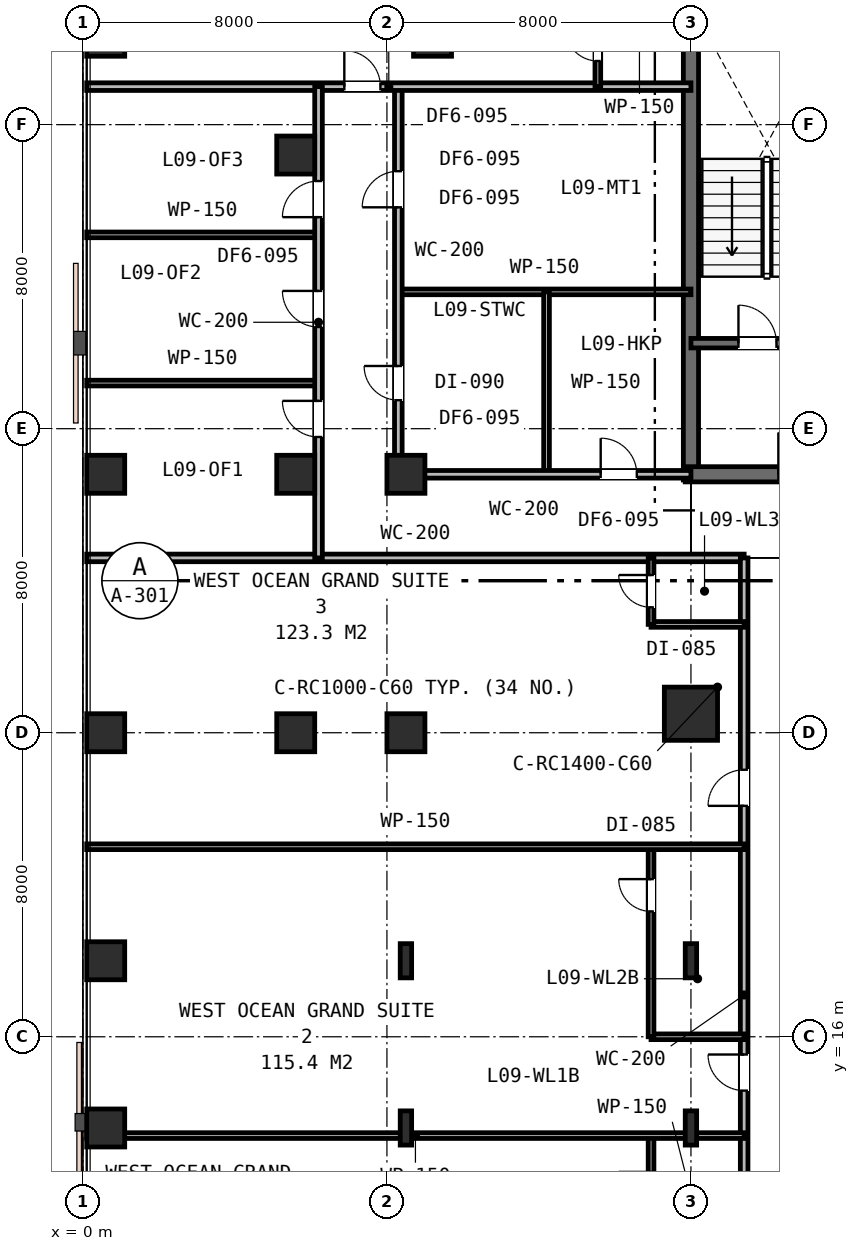
"""IFC4 building model, lengths in metres.
Left out: names, types, materials, properties, quantities, classifications, styles, units other than length and angle.
Written with IfcOpenShell. Run it as: python <this file> out.ifc"""

import sys

from ifc_helpers import new_model, si_unit, direction, frame, frame_2d, origin, origin_2d, place, context, subcontext, project, spatial, rectangle, i_section, extrude, element, fill, save


model = new_model("IFC4")
c1 = context("Model", 3, precision=1e-05, world=origin(), true_north=direction((0.0, 1.0)))
c2 = subcontext(c1, "Body", "Model", "MODEL_VIEW")
j1 = project(units=[si_unit("LENGTHUNIT", "METRE"), si_unit("PLANEANGLEUNIT", "RADIAN")], contexts=[c1])
p1 = place(None, origin())
s1 = spatial("IfcSite", under=j1, at=p1, CompositionType="ELEMENT")
p2 = place(p1, origin())
s2 = spatial("IfcBuilding", under=s1, at=p2, CompositionType="ELEMENT")
p3 = place(p2, frame((0.0, 0.0, 40.2)))
s3 = spatial("IfcBuildingStorey", under=s2, at=p3, CompositionType="ELEMENT", Elevation=40.2)
p4 = place(p3, frame((16.0, 30.65, 0.0), z_axis=(0.0, 0.0, 1.0), x_axis=(0.0, 1.0, 0.0)))
e1 = element("IfcWall", 1, at=p4, inside=s3, PredefinedType="SHEAR", context=c2, shape_type="SweptSolid", body=[
    extrude(rectangle(XDim=12.3, YDim=0.4, at=frame_2d((6.15, 0.0))), origin(), (0.0, 0.0, 1.0), 3.6),
])
p5 = place(p3, frame((15.85, 30.8, 0.0), z_axis=(0.0, 0.0, 1.0), x_axis=(1.0, 0.0, 0.0)))
e2 = element("IfcWall", 2, at=p5, inside=s3, PredefinedType="SHEAR", context=c2, shape_type="SweptSolid", body=[
    extrude(rectangle(XDim=11.2, YDim=0.4, at=frame_2d((5.6, 0.0))), origin(), (0.0, 0.0, 1.0), 3.6),
])
p6 = place(p5, frame((2.45, 0.0, 0.0)))
e3 = element("IfcOpeningElement", 3, at=p6, cuts=e2, PredefinedType="OPENING", context=c2, shape_type="SweptSolid", body=[
    extrude(rectangle(XDim=1.1, YDim=2.15, at=frame_2d((0.55, 1.075))), frame((0.0, 0.21, 0.0), z_axis=(0.0, -1.0, 0.0), x_axis=(1.0, 0.0, 0.0)), (0.0, 0.0, 1.0), 0.42),
])
p7 = place(p3, frame((16.0, 34.25, 0.0), z_axis=(0.0, 0.0, 1.0), x_axis=(1.0, 0.0, 0.0)))
e4 = element("IfcWall", 4, at=p7, inside=s3, PredefinedType="SHEAR", context=c2, shape_type="SweptSolid", body=[
    extrude(rectangle(XDim=6.05, YDim=0.25, at=frame_2d((3.025, 0.0))), origin(), (0.0, 0.0, 1.0), 3.6),
])
p8 = place(p7, frame((1.25, 0.0, 0.0)))
e5 = element("IfcOpeningElement", 5, at=p8, cuts=e4, PredefinedType="OPENING", context=c2, shape_type="SweptSolid", body=[
    extrude(rectangle(XDim=1.0, YDim=2.15, at=frame_2d((0.5, 1.075))), frame((0.0, 0.135, 0.0), z_axis=(0.0, -1.0, 0.0), x_axis=(1.0, 0.0, 0.0)), (0.0, 0.0, 1.0), 0.27),
])
p9 = place(p7, frame((4.2, 0.0, 0.0)))
e6 = element("IfcOpeningElement", 6, at=p9, cuts=e4, PredefinedType="OPENING", context=c2, shape_type="SweptSolid", body=[
    extrude(rectangle(XDim=1.1, YDim=2.15, at=frame_2d((0.55, 1.075))), frame((0.0, 0.135, 0.0), z_axis=(0.0, -1.0, 0.0), x_axis=(1.0, 0.0, 0.0)), (0.0, 0.0, 1.0), 0.27),
])
p10 = place(p3, frame((8.5, 24.0, 0.0), z_axis=(0.0, 0.0, 1.0), x_axis=(1.0, 0.0, 0.0)))
e7 = element("IfcColumn", 7, at=p10, inside=s3, PredefinedType="COLUMN", context=c2, shape_type="SweptSolid", body=[
    extrude(rectangle(XDim=1.0, YDim=1.0, at=origin_2d()), origin(), (0.0, 0.0, 1.0), 3.6),
])
p11 = place(p3, frame((16.0, 24.5, 0.0), z_axis=(0.0, 0.0, 1.0), x_axis=(1.0, 0.0, 0.0)))
e8 = element("IfcColumn", 8, at=p11, inside=s3, PredefinedType="COLUMN", context=c2, shape_type="SweptSolid", body=[
    extrude(rectangle(XDim=1.4, YDim=1.4, at=origin_2d()), origin(), (0.0, 0.0, 1.0), 3.6),
])
for number, where, z_axis, x_axis in (
    (9, (5.6, 24.0, 0.0), (0.0, 0.0, 1.0), (1.0, 0.0, 0.0)),
    (10, (5.6, 30.8, 0.0), (0.0, 0.0, 1.0), (1.0, 0.0, 0.0)),
    (11, (5.6, 39.2, 0.0), (0.0, 0.0, 1.0), (1.0, 0.0, 0.0)),
    (12, (8.5, 30.8, 0.0), (0.0, 0.0, 1.0), (1.0, 0.0, 0.0)),
    (13, (9.2, 42.3, 0.0), (0.0, 0.0, 1.0), (1.0, 0.0, 0.0)),
    (14, (0.6, 24.0, 0.0), (0.0, 0.0, 1.0), (1.0, 0.0, 0.0)),
    (15, (0.6, 30.8, 0.0), (0.0, 0.0, 1.0), (1.0, 0.0, 0.0)),
    (16, (0.6, 42.3, 0.0), (0.0, 0.0, 1.0), (1.0, 0.0, 0.0)),
    (17, (0.6, 13.6, 0.0), (0.0, 0.0, 1.0), (1.0, 0.0, 0.0)),
    (18, (0.6, 18.0, 0.0), (0.0, 0.0, 1.0), (1.0, 0.0, 0.0)),
):
    element("IfcColumn", number, at=place(p3, frame(where, z_axis=z_axis, x_axis=x_axis)), inside=s3, PredefinedType="COLUMN", context=c2, shape_type="SweptSolid", body=[
        extrude(rectangle(XDim=1.0, YDim=1.0, at=origin_2d()), origin(), (0.0, 0.0, 1.0), 3.6),
    ])
for number, where, z_axis, x_axis in (
    (19, (8.5, 13.6, 0.0), (0.0, 0.0, 1.0), (1.0, 0.0, 0.0)),
    (20, (16.0, 13.6, 0.0), (0.0, 0.0, 1.0), (1.0, 0.0, 0.0)),
    (21, (8.5, 18.0, 0.0), (0.0, 0.0, 1.0), (1.0, 0.0, 0.0)),
    (22, (16.0, 18.0, 0.0), (0.0, 0.0, 1.0), (1.0, 0.0, 0.0)),
):
    element("IfcColumn", number, at=place(p3, frame(where, z_axis=z_axis, x_axis=x_axis)), inside=s3, PredefinedType="COLUMN", context=c2, shape_type="SweptSolid", body=[
        extrude(i_section(OverallWidth=0.3, OverallDepth=0.9, WebThickness=0.018, FlangeThickness=0.035, FilletRadius=0.03, at=origin_2d()), origin(), (0.0, 0.0, 1.0), 3.6),
    ])
p12 = place(p3, frame((0.1, 28.6, 0.0), z_axis=(0.0, 0.0, 1.0), x_axis=(1.0, 0.0, 0.0)))
e23 = element("IfcWall", 23, at=p12, inside=s3, PredefinedType="PARTITIONING", context=c2, shape_type="SweptSolid", body=[
    extrude(rectangle(XDim=17.3, YDim=0.2, at=frame_2d((8.65, 0.0))), origin(), (0.0, 0.0, 1.0), 2.82),
])
p13 = place(p3, frame((8.3, 35.6, 0.0), z_axis=(0.0, 0.0, 1.0), x_axis=(1.0, 0.0, 0.0)))
e24 = element("IfcWall", 24, at=p13, inside=s3, PredefinedType="PARTITIONING", context=c2, shape_type="SweptSolid", body=[
    extrude(rectangle(XDim=7.7, YDim=0.15, at=frame_2d((3.85, 0.0))), origin(), (0.0, 0.0, 1.0), 2.82),
])
p14 = place(p3, frame((12.2, 30.8, 0.0), z_axis=(0.0, 0.0, 1.0), x_axis=(0.0, 1.0, 0.0)))
e25 = element("IfcWall", 25, at=p14, inside=s3, PredefinedType="PARTITIONING", context=c2, shape_type="SweptSolid", body=[
    extrude(rectangle(XDim=4.8, YDim=0.15, at=frame_2d((2.4, 0.0))), origin(), (0.0, 0.0, 1.0), 2.82),
])
p15 = place(p3, frame((8.3, 30.8, 0.0), z_axis=(0.0, 0.0, 1.0), x_axis=(1.0, 0.0, 0.0)))
e26 = element("IfcWall", 26, at=p15, inside=s3, PredefinedType="PARTITIONING", context=c2, shape_type="SweptSolid", body=[
    extrude(rectangle(XDim=7.7, YDim=0.2, at=frame_2d((3.85, 0.0))), origin(), (0.0, 0.0, 1.0), 2.82),
])
p16 = place(p15, frame((5.325, 0.0, 0.0)))
e27 = element("IfcOpeningElement", 27, at=p16, cuts=e26, PredefinedType="OPENING", context=c2, shape_type="SweptSolid", body=[
    extrude(rectangle(XDim=0.95, YDim=2.15, at=frame_2d((0.475, 1.075))), frame((0.0, 0.11, 0.0), z_axis=(0.0, -1.0, 0.0), x_axis=(1.0, 0.0, 0.0)), (0.0, 0.0, 1.0), 0.22),
])
p17 = place(p3, frame((8.3, 30.8, 0.0), z_axis=(0.0, 0.0, 1.0), x_axis=(0.0, 1.0, 0.0)))
e28 = element("IfcWall", 28, at=p17, inside=s3, PredefinedType="PARTITIONING", context=c2, shape_type="SweptSolid", body=[
    extrude(rectangle(XDim=10.2, YDim=0.2, at=frame_2d((5.1, 0.0))), origin(), (0.0, 0.0, 1.0), 2.82),
])
p18 = place(p17, frame((1.95, 0.0, 0.0)))
e29 = element("IfcOpeningElement", 29, at=p18, cuts=e28, PredefinedType="OPENING", context=c2, shape_type="SweptSolid", body=[
    extrude(rectangle(XDim=0.9, YDim=2.15, at=frame_2d((0.45, 1.075))), frame((0.0, 0.11, 0.0), z_axis=(0.0, -1.0, 0.0), x_axis=(1.0, 0.0, 0.0)), (0.0, 0.0, 1.0), 0.22),
])
p19 = place(p17, frame((7.025, 0.0, 0.0)))
e30 = element("IfcOpeningElement", 30, at=p19, cuts=e28, PredefinedType="OPENING", context=c2, shape_type="SweptSolid", body=[
    extrude(rectangle(XDim=0.95, YDim=2.15, at=frame_2d((0.475, 1.075))), frame((0.0, 0.11, 0.0), z_axis=(0.0, -1.0, 0.0), x_axis=(1.0, 0.0, 0.0)), (0.0, 0.0, 1.0), 0.22),
])
p20 = place(p3, frame((0.1, 41.0, 0.0), z_axis=(0.0, 0.0, 1.0), x_axis=(1.0, 0.0, 0.0)))
e31 = element("IfcWall", 31, at=p20, inside=s3, PredefinedType="PARTITIONING", context=c2, shape_type="SweptSolid", body=[
    extrude(rectangle(XDim=15.9, YDim=0.2, at=frame_2d((7.95, 0.0))), origin(), (0.0, 0.0, 1.0), 2.82),
])
p21 = place(p20, frame((6.779, 0.0, 0.0)))
e32 = element("IfcOpeningElement", 32, at=p21, cuts=e31, PredefinedType="OPENING", context=c2, shape_type="SweptSolid", body=[
    extrude(rectangle(XDim=0.95, YDim=2.15, at=frame_2d((0.475, 1.075))), frame((0.0, 0.11, 0.0), z_axis=(0.0, -1.0, 0.0), x_axis=(1.0, 0.0, 0.0)), (0.0, 0.0, 1.0), 0.22),
])
p22 = place(p3, frame((13.55, 41.0, 0.0), z_axis=(0.0, 0.0, 1.0), x_axis=(0.0, 1.0, 0.0)))
e33 = element("IfcWall", 33, at=p22, inside=s3, PredefinedType="PARTITIONING", context=c2, shape_type="SweptSolid", body=[
    extrude(rectangle(XDim=2.2, YDim=0.15, at=frame_2d((1.1, 0.0))), origin(), (0.0, 0.0, 1.0), 3.33),
])
p23 = place(p22, frame((0.675, 0.0, 0.0)))
e34 = element("IfcOpeningElement", 34, at=p23, cuts=e33, PredefinedType="OPENING", context=c2, shape_type="SweptSolid", body=[
    extrude(rectangle(XDim=0.85, YDim=2.15, at=frame_2d((0.425, 1.075))), frame((0.0, 0.085, 0.0), z_axis=(0.0, -1.0, 0.0), x_axis=(1.0, 0.0, 0.0)), (0.0, 0.0, 1.0), 0.17),
])
for number, where, z_axis, x_axis in (
    (35, (0.1, 33.2, 0.0), (0.0, 0.0, 1.0), (1.0, 0.0, 0.0)),
    (36, (0.1, 37.1, 0.0), (0.0, 0.0, 1.0), (1.0, 0.0, 0.0)),
):
    element("IfcWall", number, at=place(p3, frame(where, z_axis=z_axis, x_axis=x_axis)), inside=s3, PredefinedType="PARTITIONING", context=c2, shape_type="SweptSolid", body=[
        extrude(rectangle(XDim=6.1, YDim=0.15, at=frame_2d((3.05, 0.0))), origin(), (0.0, 0.0, 1.0), 2.82),
    ])
p24 = place(p3, frame((6.2, 28.6, 0.0), z_axis=(0.0, 0.0, 1.0), x_axis=(0.0, 1.0, 0.0)))
e37 = element("IfcWall", 37, at=p24, inside=s3, PredefinedType="PARTITIONING", context=c2, shape_type="SweptSolid", body=[
    extrude(rectangle(XDim=12.4, YDim=0.2, at=frame_2d((6.2, 0.0))), origin(), (0.0, 0.0, 1.0), 2.82),
])
p25 = place(p24, frame((3.182, 0.0, 0.0)))
e38 = element("IfcOpeningElement", 38, at=p25, cuts=e37, PredefinedType="OPENING", context=c2, shape_type="SweptSolid", body=[
    extrude(rectangle(XDim=0.95, YDim=2.15, at=frame_2d((0.475, 1.075))), frame((0.0, 0.11, 0.0), z_axis=(0.0, -1.0, 0.0), x_axis=(1.0, 0.0, 0.0)), (0.0, 0.0, 1.0), 0.22),
])
p26 = place(p24, frame((6.075, 0.0, 0.0)))
e39 = element("IfcOpeningElement", 39, at=p26, cuts=e37, PredefinedType="OPENING", context=c2, shape_type="SweptSolid", body=[
    extrude(rectangle(XDim=0.95, YDim=2.15, at=frame_2d((0.475, 1.075))), frame((0.0, 0.11, 0.0), z_axis=(0.0, -1.0, 0.0), x_axis=(1.0, 0.0, 0.0)), (0.0, 0.0, 1.0), 0.22),
])
p27 = place(p24, frame((8.966, 0.0, 0.0)))
e40 = element("IfcOpeningElement", 40, at=p27, cuts=e37, PredefinedType="OPENING", context=c2, shape_type="SweptSolid", body=[
    extrude(rectangle(XDim=0.95, YDim=2.15, at=frame_2d((0.475, 1.075))), frame((0.0, 0.11, 0.0), z_axis=(0.0, -1.0, 0.0), x_axis=(1.0, 0.0, 0.0)), (0.0, 0.0, 1.0), 0.22),
])
p28 = place(p3, frame((17.4, 5.6, 0.0), z_axis=(0.0, 0.0, 1.0), x_axis=(0.0, 1.0, 0.0)))
e41 = element("IfcWall", 41, at=p28, inside=s3, PredefinedType="PARTITIONING", context=c2, shape_type="SweptSolid", body=[
    extrude(rectangle(XDim=23.0, YDim=0.2, at=frame_2d((11.5, 0.0))), origin(), (0.0, 0.0, 1.0), 2.82),
])
p29 = place(p28, frame((0.84, 0.0, 0.0)))
e42 = element("IfcOpeningElement", 42, at=p29, cuts=e41, PredefinedType="OPENING", context=c2, shape_type="SweptSolid", body=[
    extrude(rectangle(XDim=0.95, YDim=2.15, at=frame_2d((0.475, 1.075))), frame((0.0, 0.11, 0.0), z_axis=(0.0, -1.0, 0.0), x_axis=(1.0, 0.0, 0.0)), (0.0, 0.0, 1.0), 0.22),
])
p30 = place(p28, frame((8.983, 0.0, 0.0)))
e43 = element("IfcOpeningElement", 43, at=p30, cuts=e41, PredefinedType="OPENING", context=c2, shape_type="SweptSolid", body=[
    extrude(rectangle(XDim=0.95, YDim=2.15, at=frame_2d((0.475, 1.075))), frame((0.0, 0.11, 0.0), z_axis=(0.0, -1.0, 0.0), x_axis=(1.0, 0.0, 0.0)), (0.0, 0.0, 1.0), 0.22),
])
p31 = place(p28, frame((16.476, 0.0, 0.0)))
e44 = element("IfcOpeningElement", 44, at=p31, cuts=e41, PredefinedType="OPENING", context=c2, shape_type="SweptSolid", body=[
    extrude(rectangle(XDim=0.95, YDim=2.15, at=frame_2d((0.475, 1.075))), frame((0.0, 0.11, 0.0), z_axis=(0.0, -1.0, 0.0), x_axis=(1.0, 0.0, 0.0)), (0.0, 0.0, 1.0), 0.22),
])
p32 = place(p3, frame((14.95, 11.15, 0.0), z_axis=(0.0, 0.0, 1.0), x_axis=(0.0, 1.0, 0.0)))
e45 = element("IfcWall", 45, at=p32, inside=s3, PredefinedType="PARTITIONING", context=c2, shape_type="SweptSolid", body=[
    extrude(rectangle(XDim=2.25, YDim=0.15, at=frame_2d((1.125, 0.0))), origin(), (0.0, 0.0, 1.0), 2.82),
])
p33 = place(p32, frame((0.444, 0.0, 0.0)))
e46 = element("IfcOpeningElement", 46, at=p33, cuts=e45, PredefinedType="OPENING", context=c2, shape_type="SweptSolid", body=[
    extrude(rectangle(XDim=0.85, YDim=2.15, at=frame_2d((0.425, 1.075))), frame((0.0, 0.085, 0.0), z_axis=(0.0, -1.0, 0.0), x_axis=(1.0, 0.0, 0.0)), (0.0, 0.0, 1.0), 0.17),
])
p34 = place(p3, frame((0.1, 13.4, 0.0), z_axis=(0.0, 0.0, 1.0), x_axis=(1.0, 0.0, 0.0)))
e47 = element("IfcWall", 47, at=p34, inside=s3, PredefinedType="PARTITIONING", context=c2, shape_type="SweptSolid", body=[
    extrude(rectangle(XDim=17.3, YDim=0.15, at=frame_2d((8.65, 0.0))), origin(), (0.0, 0.0, 1.0), 2.82),
])
p35 = place(p3, frame((14.95, 16.0, 0.0), z_axis=(0.0, 0.0, 1.0), x_axis=(1.0, 0.0, 0.0)))
e48 = element("IfcWall", 48, at=p35, inside=s3, PredefinedType="PARTITIONING", context=c2, shape_type="SweptSolid", body=[
    extrude(rectangle(XDim=2.45, YDim=0.15, at=frame_2d((1.225, 0.0))), origin(), (0.0, 0.0, 1.0), 2.82),
])
p36 = place(p3, frame((14.95, 16.0, 0.0), z_axis=(0.0, 0.0, 1.0), x_axis=(0.0, 1.0, 0.0)))
e49 = element("IfcWall", 49, at=p36, inside=s3, PredefinedType="PARTITIONING", context=c2, shape_type="SweptSolid", body=[
    extrude(rectangle(XDim=5.0, YDim=0.15, at=frame_2d((2.5, 0.0))), origin(), (0.0, 0.0, 1.0), 2.82),
])
p37 = place(p36, frame((3.298, 0.0, 0.0)))
e50 = element("IfcOpeningElement", 50, at=p37, cuts=e49, PredefinedType="OPENING", context=c2, shape_type="SweptSolid", body=[
    extrude(rectangle(XDim=0.85, YDim=2.15, at=frame_2d((0.425, 1.075))), frame((0.0, 0.085, 0.0), z_axis=(0.0, -1.0, 0.0), x_axis=(1.0, 0.0, 0.0)), (0.0, 0.0, 1.0), 0.17),
])
p38 = place(p3, frame((0.1, 21.0, 0.0), z_axis=(0.0, 0.0, 1.0), x_axis=(1.0, 0.0, 0.0)))
e51 = element("IfcWall", 51, at=p38, inside=s3, PredefinedType="PARTITIONING", context=c2, shape_type="SweptSolid", body=[
    extrude(rectangle(XDim=17.3, YDim=0.15, at=frame_2d((8.65, 0.0))), origin(), (0.0, 0.0, 1.0), 2.82),
])
p39 = place(p3, frame((14.95, 26.85, 0.0), z_axis=(0.0, 0.0, 1.0), x_axis=(1.0, 0.0, 0.0)))
e52 = element("IfcWall", 52, at=p39, inside=s3, PredefinedType="PARTITIONING", context=c2, shape_type="SweptSolid", body=[
    extrude(rectangle(XDim=2.45, YDim=0.15, at=frame_2d((1.225, 0.0))), origin(), (0.0, 0.0, 1.0), 2.82),
])
p40 = place(p3, frame((14.95, 26.85, 0.0), z_axis=(0.0, 0.0, 1.0), x_axis=(0.0, 1.0, 0.0)))
e53 = element("IfcWall", 53, at=p40, inside=s3, PredefinedType="PARTITIONING", context=c2, shape_type="SweptSolid", body=[
    extrude(rectangle(XDim=1.75, YDim=0.15, at=frame_2d((0.875, 0.0))), origin(), (0.0, 0.0, 1.0), 3.33),
])
p41 = place(p40, frame((0.45, 0.0, 0.0)))
e54 = element("IfcOpeningElement", 54, at=p41, cuts=e53, PredefinedType="OPENING", context=c2, shape_type="SweptSolid", body=[
    extrude(rectangle(XDim=0.85, YDim=2.15, at=frame_2d((0.425, 1.075))), frame((0.0, 0.085, 0.0), z_axis=(0.0, -1.0, 0.0), x_axis=(1.0, 0.0, 0.0)), (0.0, 0.0, 1.0), 0.17),
])
p42 = place(p8, origin())
e55 = element("IfcDoor", 55, at=p42, inside=s3, OperationType="SINGLE_SWING_LEFT", PredefinedType="DOOR", context=c2, shape_type="SweptSolid", body=[
    extrude(rectangle(XDim=1.0, YDim=2.15, at=frame_2d((0.5, 1.075))), frame((0.0, 0.025, 0.0), z_axis=(0.0, -1.0, 0.0), x_axis=(1.0, 0.0, 0.0)), (0.0, 0.0, 1.0), 0.05),
])
fill(e5, e55)
p43 = place(p6, origin())
e56 = element("IfcDoor", 56, at=p43, inside=s3, OperationType="SINGLE_SWING_LEFT", PredefinedType="DOOR", context=c2, shape_type="SweptSolid", body=[
    extrude(rectangle(XDim=1.1, YDim=2.15, at=frame_2d((0.55, 1.075))), frame((0.0, 0.025, 0.0), z_axis=(0.0, -1.0, 0.0), x_axis=(1.0, 0.0, 0.0)), (0.0, 0.0, 1.0), 0.05),
])
fill(e3, e56)
p44 = place(p16, origin())
e57 = element("IfcDoor", 57, at=p44, inside=s3, OperationType="SINGLE_SWING_LEFT", PredefinedType="DOOR", context=c2, shape_type="SweptSolid", body=[
    extrude(rectangle(XDim=0.95, YDim=2.15, at=frame_2d((0.475, 1.075))), frame((0.0, 0.025, 0.0), z_axis=(0.0, -1.0, 0.0), x_axis=(1.0, 0.0, 0.0)), (0.0, 0.0, 1.0), 0.05),
])
fill(e27, e57)
p45 = place(p18, origin())
e58 = element("IfcDoor", 58, at=p45, inside=s3, OperationType="SINGLE_SWING_RIGHT", PredefinedType="DOOR", context=c2, shape_type="SweptSolid", body=[
    extrude(rectangle(XDim=0.9, YDim=2.15, at=frame_2d((0.45, 1.075))), frame((0.0, 0.025, 0.0), z_axis=(0.0, -1.0, 0.0), x_axis=(1.0, 0.0, 0.0)), (0.0, 0.0, 1.0), 0.05),
])
fill(e29, e58)
p46 = place(p21, origin())
e59 = element("IfcDoor", 59, at=p46, inside=s3, OperationType="SINGLE_SWING_LEFT", PredefinedType="DOOR", context=c2, shape_type="SweptSolid", body=[
    extrude(rectangle(XDim=0.95, YDim=2.15, at=frame_2d((0.475, 1.075))), frame((0.0, 0.025, 0.0), z_axis=(0.0, -1.0, 0.0), x_axis=(1.0, 0.0, 0.0)), (0.0, 0.0, 1.0), 0.05),
])
fill(e32, e59)
p47 = place(p23, origin())
e60 = element("IfcDoor", 60, at=p47, inside=s3, OperationType="SINGLE_SWING_RIGHT", PredefinedType="DOOR", context=c2, shape_type="SweptSolid", body=[
    extrude(rectangle(XDim=0.85, YDim=2.15, at=frame_2d((0.425, 1.075))), frame((0.0, 0.025, 0.0), z_axis=(0.0, -1.0, 0.0), x_axis=(1.0, 0.0, 0.0)), (0.0, 0.0, 1.0), 0.05),
])
fill(e34, e60)
p48 = place(p25, origin())
e61 = element("IfcDoor", 61, at=p48, inside=s3, OperationType="SINGLE_SWING_RIGHT", PredefinedType="DOOR", context=c2, shape_type="SweptSolid", body=[
    extrude(rectangle(XDim=0.95, YDim=2.15, at=frame_2d((0.475, 1.075))), frame((0.0, 0.025, 0.0), z_axis=(0.0, -1.0, 0.0), x_axis=(1.0, 0.0, 0.0)), (0.0, 0.0, 1.0), 0.05),
])
fill(e38, e61)
p49 = place(p26, origin())
e62 = element("IfcDoor", 62, at=p49, inside=s3, OperationType="SINGLE_SWING_RIGHT", PredefinedType="DOOR", context=c2, shape_type="SweptSolid", body=[
    extrude(rectangle(XDim=0.95, YDim=2.15, at=frame_2d((0.475, 1.075))), frame((0.0, 0.025, 0.0), z_axis=(0.0, -1.0, 0.0), x_axis=(1.0, 0.0, 0.0)), (0.0, 0.0, 1.0), 0.05),
])
fill(e39, e62)
p50 = place(p27, origin())
e63 = element("IfcDoor", 63, at=p50, inside=s3, OperationType="SINGLE_SWING_LEFT", PredefinedType="DOOR", context=c2, shape_type="SweptSolid", body=[
    extrude(rectangle(XDim=0.95, YDim=2.15, at=frame_2d((0.475, 1.075))), frame((0.0, 0.025, 0.0), z_axis=(0.0, -1.0, 0.0), x_axis=(1.0, 0.0, 0.0)), (0.0, 0.0, 1.0), 0.05),
])
fill(e40, e63)
p51 = place(p19, origin())
e64 = element("IfcDoor", 64, at=p51, inside=s3, OperationType="SINGLE_SWING_LEFT", PredefinedType="DOOR", context=c2, shape_type="SweptSolid", body=[
    extrude(rectangle(XDim=0.95, YDim=2.15, at=frame_2d((0.475, 1.075))), frame((0.0, 0.025, 0.0), z_axis=(0.0, -1.0, 0.0), x_axis=(1.0, 0.0, 0.0)), (0.0, 0.0, 1.0), 0.05),
])
fill(e30, e64)
p52 = place(p30, origin())
e65 = element("IfcDoor", 65, at=p52, inside=s3, OperationType="SINGLE_SWING_RIGHT", PredefinedType="DOOR", context=c2, shape_type="SweptSolid", body=[
    extrude(rectangle(XDim=0.95, YDim=2.15, at=frame_2d((0.475, 1.075))), frame((0.0, 0.025, 0.0), z_axis=(0.0, -1.0, 0.0), x_axis=(1.0, 0.0, 0.0)), (0.0, 0.0, 1.0), 0.05),
])
fill(e43, e65)
p53 = place(p37, origin())
e66 = element("IfcDoor", 66, at=p53, inside=s3, OperationType="SINGLE_SWING_RIGHT", PredefinedType="DOOR", context=c2, shape_type="SweptSolid", body=[
    extrude(rectangle(XDim=0.85, YDim=2.15, at=frame_2d((0.425, 1.075))), frame((0.0, 0.025, 0.0), z_axis=(0.0, -1.0, 0.0), x_axis=(1.0, 0.0, 0.0)), (0.0, 0.0, 1.0), 0.05),
])
fill(e50, e66)
p54 = place(p31, origin())
e67 = element("IfcDoor", 67, at=p54, inside=s3, OperationType="SINGLE_SWING_LEFT", PredefinedType="DOOR", context=c2, shape_type="SweptSolid", body=[
    extrude(rectangle(XDim=0.95, YDim=2.15, at=frame_2d((0.475, 1.075))), frame((0.0, 0.025, 0.0), z_axis=(0.0, -1.0, 0.0), x_axis=(1.0, 0.0, 0.0)), (0.0, 0.0, 1.0), 0.05),
])
fill(e44, e67)
p55 = place(p41, origin())
e68 = element("IfcDoor", 68, at=p55, inside=s3, OperationType="SINGLE_SWING_RIGHT", PredefinedType="DOOR", context=c2, shape_type="SweptSolid", body=[
    extrude(rectangle(XDim=0.85, YDim=2.15, at=frame_2d((0.425, 1.075))), frame((0.0, 0.025, 0.0), z_axis=(0.0, -1.0, 0.0), x_axis=(1.0, 0.0, 0.0)), (0.0, 0.0, 1.0), 0.05),
])
fill(e54, e68)
save(model, sys.argv[1])
